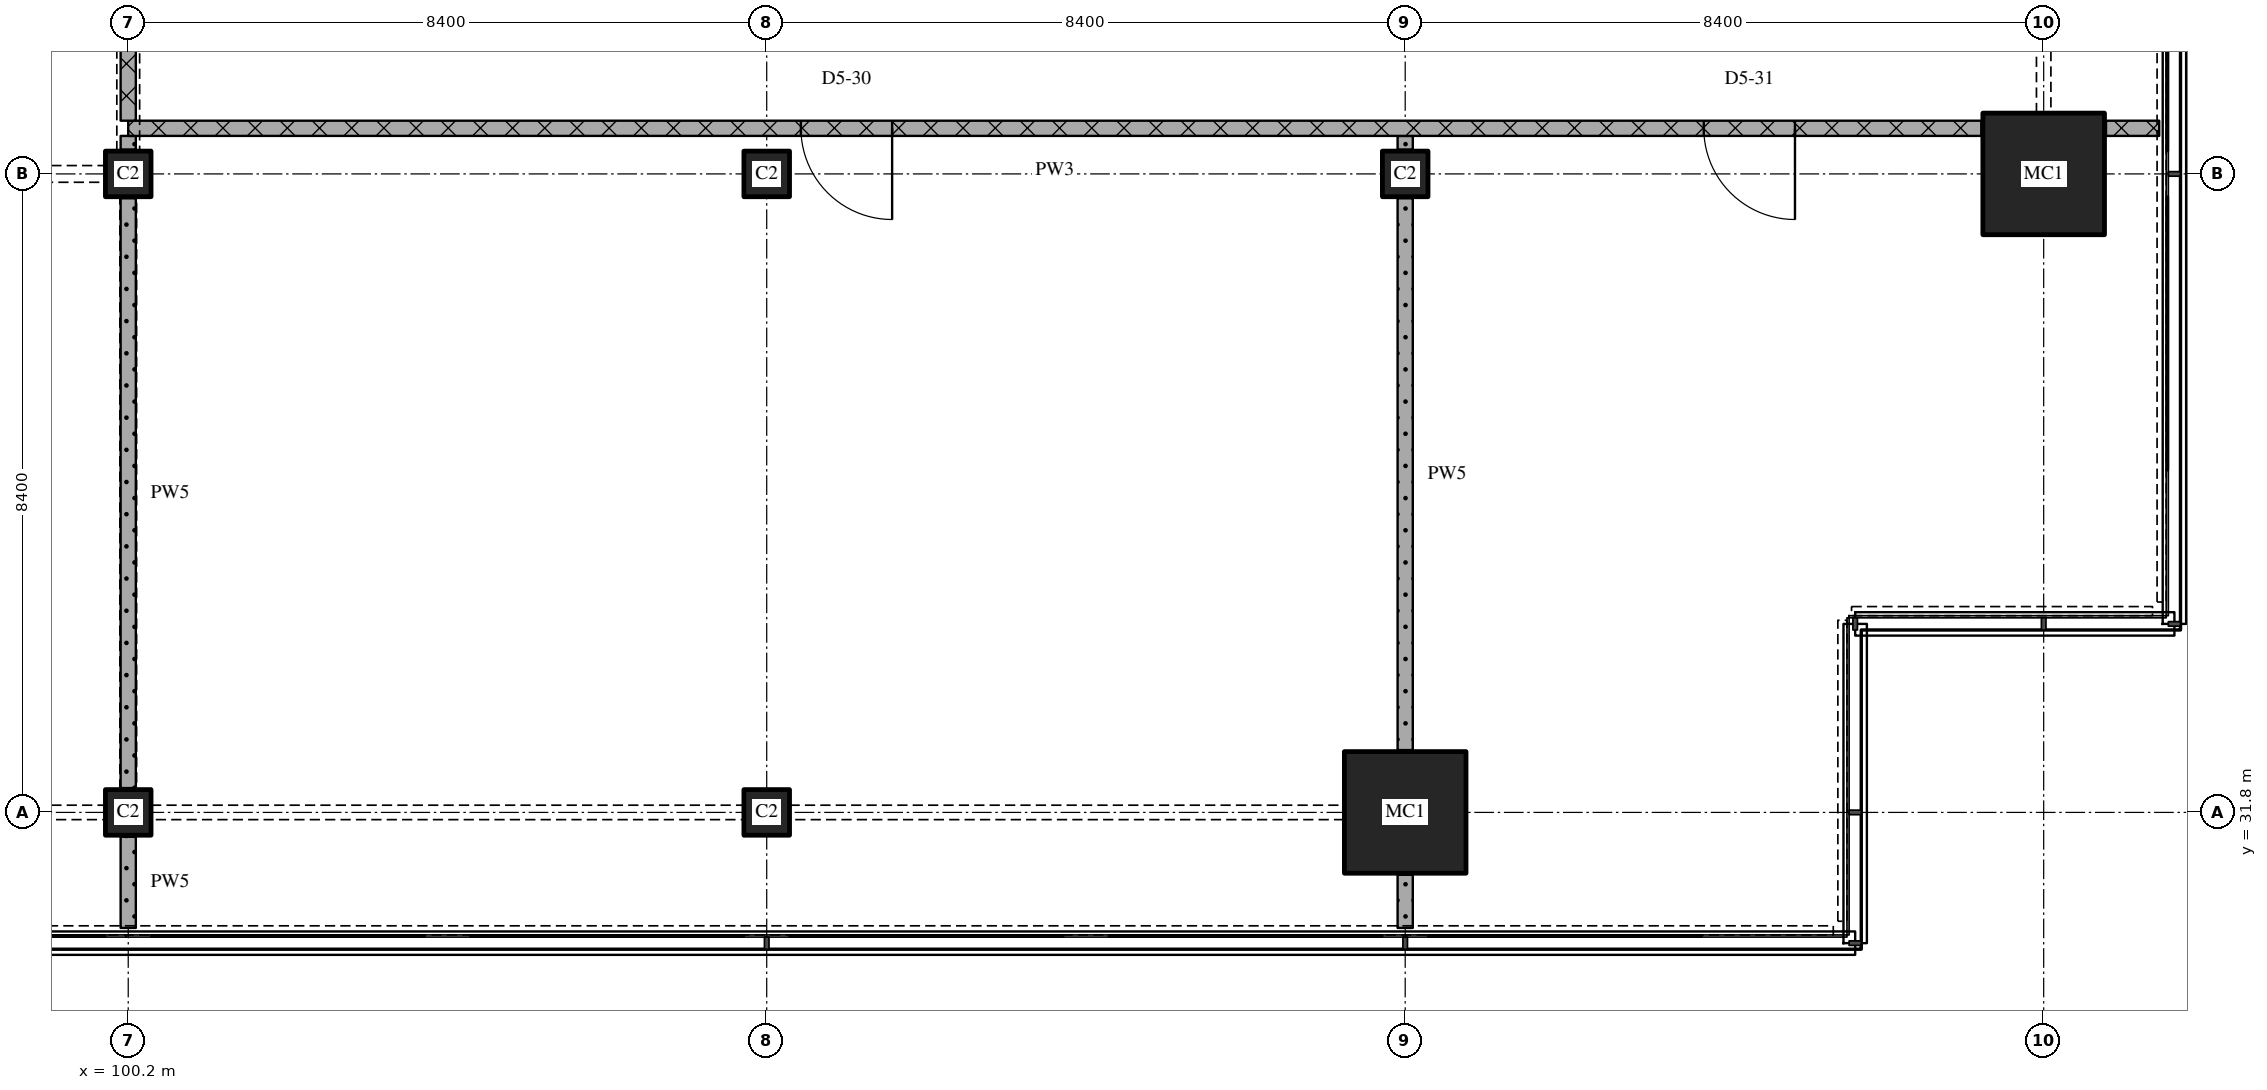
"""IFC4 building model, lengths in metres.
Left out: names, types, materials, properties, quantities, classifications, styles, units other than length and angle.
Written with IfcOpenShell. Run it as: python <this file> out.ifc"""

import sys

from ifc_helpers import new_model, si_unit, direction, frame, frame_2d, origin, origin_2d, place, context, subcontext, project, spatial, rectangle, extrude, element, fill, save


model = new_model("IFC4")
c1 = context("Model", 3, precision=1e-05, world=origin(), true_north=direction((0.0, 1.0)))
c2 = subcontext(c1, "Body", "Model", "MODEL_VIEW")
j1 = project(units=[si_unit("LENGTHUNIT", "METRE"), si_unit("PLANEANGLEUNIT", "RADIAN")], contexts=[c1])
p1 = place(None, origin())
s1 = spatial("IfcSite", under=j1, at=p1, CompositionType="ELEMENT")
p2 = place(p1, origin())
s2 = spatial("IfcBuilding", under=s1, at=p2, CompositionType="ELEMENT")
p3 = place(p2, frame((0.0, 0.0, 248.7)))
s3 = spatial("IfcBuildingStorey", under=s2, at=p3, CompositionType="ELEMENT", Elevation=248.7)
for number, where, z_axis, x_axis in (
    (1, (100.2, 31.8, 0.0), (0.0, 0.0, 1.0), (1.0, 0.0, 0.0)),
    (2, (100.2, 40.2, 0.0), (0.0, 0.0, 1.0), (1.0, 0.0, 0.0)),
    (3, (108.6, 31.8, 0.0), (0.0, 0.0, 1.0), (1.0, 0.0, 0.0)),
    (4, (108.6, 40.2, 0.0), (0.0, 0.0, 1.0), (1.0, 0.0, 0.0)),
):
    element("IfcColumn", number, at=place(p3, frame(where, z_axis=z_axis, x_axis=x_axis)), inside=s3, PredefinedType="COLUMN", context=c2, shape_type="SweptSolid", body=[
        extrude(rectangle(XDim=0.6, YDim=0.6, at=origin_2d()), origin(), (0.0, 0.0, 1.0), 3.6),
    ])
p4 = place(p3, frame((117.0, 31.8, 0.0), z_axis=(0.0, 0.0, 1.0), x_axis=(1.0, 0.0, 0.0)))
e5 = element("IfcColumn", 5, at=p4, inside=s3, PredefinedType="COLUMN", context=c2, shape_type="SweptSolid", body=[
    extrude(rectangle(XDim=1.6, YDim=1.6, at=origin_2d()), origin(), (0.0, 0.0, 1.0), 3.6),
])
p5 = place(p3, frame((117.0, 40.2, 0.0), z_axis=(0.0, 0.0, 1.0), x_axis=(1.0, 0.0, 0.0)))
e6 = element("IfcColumn", 6, at=p5, inside=s3, PredefinedType="COLUMN", context=c2, shape_type="SweptSolid", body=[
    extrude(rectangle(XDim=0.6, YDim=0.6, at=origin_2d()), origin(), (0.0, 0.0, 1.0), 3.6),
])
p6 = place(p3, frame((125.4, 40.2, 0.0), z_axis=(0.0, 0.0, 1.0), x_axis=(1.0, 0.0, 0.0)))
e7 = element("IfcColumn", 7, at=p6, inside=s3, PredefinedType="COLUMN", context=c2, shape_type="SweptSolid", body=[
    extrude(rectangle(XDim=1.6, YDim=1.6, at=origin_2d()), origin(), (0.0, 0.0, 1.0), 3.6),
])
p7 = place(p3, frame((124.58, 40.8, 0.0), z_axis=(0.0, 0.0, 1.0), x_axis=(-1.0, 0.0, 0.0)))
e8 = element("IfcWall", 8, at=p7, inside=s3, PredefinedType="PARTITIONING", context=c2, shape_type="SweptSolid", body=[
    extrude(rectangle(XDim=24.38, YDim=0.2, at=frame_2d((12.19, 0.0))), origin(), (0.0, 0.0, 1.0), 3.3),
])
p8 = place(p7, frame((2.452, 0.0, 0.0)))
e9 = element("IfcOpeningElement", 9, at=p8, cuts=e8, PredefinedType="OPENING", context=c2, shape_type="SweptSolid", body=[
    extrude(rectangle(XDim=1.2, YDim=2.1, at=frame_2d((0.6, 1.05))), frame((0.0, 0.11, 0.0), z_axis=(0.0, -1.0, 0.0), x_axis=(1.0, 0.0, 0.0)), (0.0, 0.0, 1.0), 0.22),
])
p9 = place(p7, frame((14.33, 0.0, 0.0)))
e10 = element("IfcOpeningElement", 10, at=p9, cuts=e8, PredefinedType="OPENING", context=c2, shape_type="SweptSolid", body=[
    extrude(rectangle(XDim=1.2, YDim=2.1, at=frame_2d((0.6, 1.05))), frame((0.0, 0.11, 0.0), z_axis=(0.0, -1.0, 0.0), x_axis=(1.0, 0.0, 0.0)), (0.0, 0.0, 1.0), 0.22),
])
p10 = place(p3, frame((126.22, 40.8, 0.0), z_axis=(0.0, 0.0, 1.0), x_axis=(1.0, 0.0, 0.0)))
e11 = element("IfcWall", 11, at=p10, inside=s3, PredefinedType="PARTITIONING", context=c2, shape_type="SweptSolid", body=[
    extrude(rectangle(XDim=0.7, YDim=0.2, at=frame_2d((0.35, 0.0))), origin(), (0.0, 0.0, 1.0), 3.3),
])
p11 = place(p3, frame((100.2, 43.1, 0.0), z_axis=(0.0, 0.0, 1.0), x_axis=(0.0, -1.0, 0.0)))
e12 = element("IfcWall", 12, at=p11, inside=s3, PredefinedType="PARTITIONING", context=c2, shape_type="SweptSolid", body=[
    extrude(rectangle(XDim=2.2, YDim=0.2, at=frame_2d((1.1, 0.0))), origin(), (0.0, 0.0, 1.0), 2.51),
])
p12 = place(p3, frame((100.2, 31.48, 0.0), z_axis=(0.0, 0.0, 1.0), x_axis=(0.0, -1.0, 0.0)))
e13 = element("IfcWall", 13, at=p12, inside=s3, PredefinedType="PARTITIONING", context=c2, shape_type="SweptSolid", body=[
    extrude(rectangle(XDim=1.2, YDim=0.2, at=frame_2d((0.6, 0.0))), origin(), (0.0, 0.0, 1.0), 2.41),
])
p13 = place(p3, frame((100.2, 39.88, 0.0), z_axis=(0.0, 0.0, 1.0), x_axis=(0.0, -1.0, 0.0)))
e14 = element("IfcWall", 14, at=p13, inside=s3, PredefinedType="PARTITIONING", context=c2, shape_type="SweptSolid", body=[
    extrude(rectangle(XDim=7.76, YDim=0.2, at=frame_2d((3.88, 0.0))), origin(), (0.0, 0.0, 1.0), 2.7),
])
p14 = place(p3, frame((100.2, 40.7, 0.0), z_axis=(0.0, 0.0, 1.0), x_axis=(0.0, -1.0, 0.0)))
e15 = element("IfcWall", 15, at=p14, inside=s3, PredefinedType="PARTITIONING", context=c2, shape_type="SweptSolid", body=[
    extrude(rectangle(XDim=0.18, YDim=0.2, at=frame_2d((0.09, 0.0))), origin(), (0.0, 0.0, 1.0), 3.3),
])
p15 = place(p3, frame((117.0, 30.98, 0.0), z_axis=(0.0, 0.0, 1.0), x_axis=(0.0, -1.0, 0.0)))
e16 = element("IfcWall", 16, at=p15, inside=s3, PredefinedType="PARTITIONING", context=c2, shape_type="SweptSolid", body=[
    extrude(rectangle(XDim=0.7, YDim=0.2, at=frame_2d((0.35, 0.0))), origin(), (0.0, 0.0, 1.0), 3.3),
])
p16 = place(p3, frame((117.0, 39.88, 0.0), z_axis=(0.0, 0.0, 1.0), x_axis=(0.0, -1.0, 0.0)))
e17 = element("IfcWall", 17, at=p16, inside=s3, PredefinedType="PARTITIONING", context=c2, shape_type="SweptSolid", body=[
    extrude(rectangle(XDim=7.26, YDim=0.2, at=frame_2d((3.63, 0.0))), origin(), (0.0, 0.0, 1.0), 3.3),
])
p17 = place(p3, frame((117.0, 40.7, 0.0), z_axis=(0.0, 0.0, 1.0), x_axis=(0.0, -1.0, 0.0)))
e18 = element("IfcWall", 18, at=p17, inside=s3, PredefinedType="PARTITIONING", context=c2, shape_type="SweptSolid", body=[
    extrude(rectangle(XDim=0.18, YDim=0.2, at=frame_2d((0.09, 0.0))), origin(), (0.0, 0.0, 1.0), 3.3),
])
p18 = place(p8, origin())
e19 = element("IfcDoor", 19, at=p18, inside=s3, OperationType="SINGLE_SWING_LEFT", PredefinedType="DOOR", context=c2, shape_type="SweptSolid", body=[
    extrude(rectangle(XDim=1.2, YDim=2.1, at=frame_2d((0.6, 1.05))), frame((0.0, 0.025, 0.0), z_axis=(0.0, -1.0, 0.0), x_axis=(1.0, 0.0, 0.0)), (0.0, 0.0, 1.0), 0.05),
])
fill(e9, e19)
p19 = place(p9, origin())
e20 = element("IfcDoor", 20, at=p19, inside=s3, OperationType="SINGLE_SWING_LEFT", PredefinedType="DOOR", context=c2, shape_type="SweptSolid", body=[
    extrude(rectangle(XDim=1.2, YDim=2.1, at=frame_2d((0.6, 1.05))), frame((0.0, 0.025, 0.0), z_axis=(0.0, -1.0, 0.0), x_axis=(1.0, 0.0, 0.0)), (0.0, 0.0, 1.0), 0.05),
])
fill(e10, e20)
save(model, sys.argv[1])
